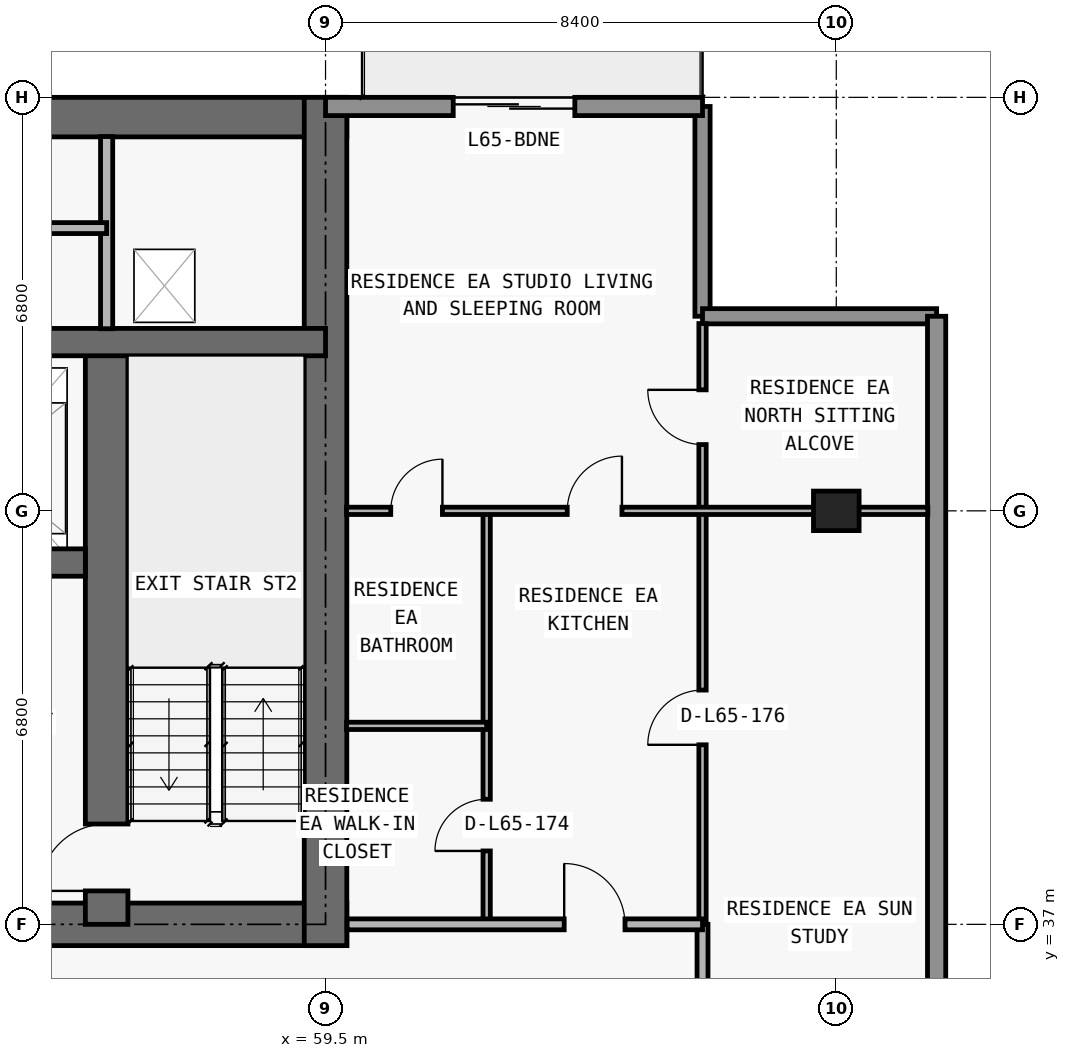
"""IFC4 building model, lengths in metres.
Left out: names, types, materials, properties, quantities, classifications, styles, units other than length and angle.
Written with IfcOpenShell. Run it as: python <this file> out.ifc"""

import sys

from ifc_helpers import new_model, si_unit, direction, frame, frame_2d, origin, origin_2d, place, context, subcontext, project, spatial, rectangle, extrude, element, fill, save


model = new_model("IFC4")
c1 = context("Model", 3, precision=1e-05, world=origin(), true_north=direction((0.0, 1.0)))
c2 = subcontext(c1, "Body", "Model", "MODEL_VIEW")
j1 = project(units=[si_unit("LENGTHUNIT", "METRE"), si_unit("PLANEANGLEUNIT", "RADIAN")], contexts=[c1])
p1 = place(None, origin())
s1 = spatial("IfcSite", under=j1, at=p1, CompositionType="ELEMENT")
p2 = place(p1, origin())
s2 = spatial("IfcBuilding", under=s1, at=p2, CompositionType="ELEMENT")
p3 = place(p2, frame((0.0, 0.0, 233.1)))
s3 = spatial("IfcBuildingStorey", under=s2, at=p3, CompositionType="ELEMENT", Elevation=233.1)
p4 = place(p3, frame((67.9, 43.8, 0.0), z_axis=(0.0, 0.0, 1.0), x_axis=(1.0, 0.0, 0.0)))
e1 = element("IfcColumn", 1, at=p4, inside=s3, PredefinedType="COLUMN", context=c2, shape_type="SweptSolid", body=[
    extrude(rectangle(XDim=0.75, YDim=0.65, at=origin_2d()), origin(), (0.0, 0.0, 1.0), 3.05),
])
p5 = place(p3, frame((17.95, 37.0, 0.0), z_axis=(0.0, 0.0, 1.0), x_axis=(1.0, 0.0, 0.0)))
e2 = element("IfcWall", 2, at=p5, inside=s3, PredefinedType="SHEAR", context=c2, shape_type="SweptSolid", body=[
    extrude(rectangle(XDim=41.9, YDim=0.7, at=frame_2d((20.95, 0.0))), origin(), (0.0, 0.0, 1.0), 3.05),
])
p6 = place(p5, frame((14.35, 0.0, 0.0)))
e3 = element("IfcOpeningElement", 3, at=p6, cuts=e2, PredefinedType="OPENING", context=c2, shape_type="SweptSolid", body=[
    extrude(rectangle(XDim=1.1, YDim=2.15, at=frame_2d((0.55, 1.075))), frame((0.0, 0.36, 0.0), z_axis=(0.0, -1.0, 0.0), x_axis=(1.0, 0.0, 0.0)), (0.0, 0.0, 1.0), 0.72),
])
p7 = place(p5, frame((6.2, 0.0, 0.0)))
e4 = element("IfcOpeningElement", 4, at=p7, cuts=e2, PredefinedType="OPENING", context=c2, shape_type="SweptSolid", body=[
    extrude(rectangle(XDim=1.05, YDim=2.15, at=frame_2d((0.525, 1.075))), frame((0.0, 0.36, 0.0), z_axis=(0.0, -1.0, 0.0), x_axis=(1.0, 0.0, 0.0)), (0.0, 0.0, 1.0), 0.72),
])
p8 = place(p5, frame((34.7, 0.0, 0.0)))
e5 = element("IfcOpeningElement", 5, at=p8, cuts=e2, PredefinedType="OPENING", context=c2, shape_type="SweptSolid", body=[
    extrude(rectangle(XDim=1.05, YDim=2.15, at=frame_2d((0.525, 1.075))), frame((0.0, 0.36, 0.0), z_axis=(0.0, -1.0, 0.0), x_axis=(1.0, 0.0, 0.0)), (0.0, 0.0, 1.0), 0.72),
])
p9 = place(p5, frame((10.812, 0.0, 0.0)))
e6 = element("IfcOpeningElement", 6, at=p9, cuts=e2, PredefinedType="OPENING", context=c2, shape_type="SweptSolid", body=[
    extrude(rectangle(XDim=1.05, YDim=2.15, at=frame_2d((0.525, 1.075))), frame((0.0, 0.36, 0.0), z_axis=(0.0, -1.0, 0.0), x_axis=(1.0, 0.0, 0.0)), (0.0, 0.0, 1.0), 0.72),
])
p10 = place(p5, frame((24.05, 0.0, 0.0)))
e7 = element("IfcOpeningElement", 7, at=p10, cuts=e2, PredefinedType="OPENING", context=c2, shape_type="SweptSolid", body=[
    extrude(rectangle(XDim=1.05, YDim=2.15, at=frame_2d((0.525, 1.075))), frame((0.0, 0.36, 0.0), z_axis=(0.0, -1.0, 0.0), x_axis=(1.0, 0.0, 0.0)), (0.0, 0.0, 1.0), 0.72),
])
p11 = place(p3, frame((17.95, 50.275, 0.0), z_axis=(0.0, 0.0, 1.0), x_axis=(1.0, 0.0, 0.0)))
e8 = element("IfcWall", 8, at=p11, inside=s3, PredefinedType="SHEAR", context=c2, shape_type="SweptSolid", body=[
    extrude(rectangle(XDim=41.9, YDim=0.65, at=frame_2d((20.95, 0.0))), origin(), (0.0, 0.0, 1.0), 3.05),
])
p12 = place(p3, frame((59.5, 36.65, 0.0), z_axis=(0.0, 0.0, 1.0), x_axis=(0.0, 1.0, 0.0)))
e9 = element("IfcWall", 9, at=p12, inside=s3, PredefinedType="SHEAR", context=c2, shape_type="SweptSolid", body=[
    extrude(rectangle(XDim=13.95, YDim=0.7, at=frame_2d((6.975, 0.0))), origin(), (0.0, 0.0, 1.0), 3.05),
])
p13 = place(p3, frame((55.9, 37.0, 0.0), z_axis=(0.0, 0.0, 1.0), x_axis=(0.0, 1.0, 0.0)))
e10 = element("IfcWall", 10, at=p13, inside=s3, PredefinedType="SHEAR", context=c2, shape_type="SweptSolid", body=[
    extrude(rectangle(XDim=9.575, YDim=0.7, at=frame_2d((4.788, 0.0))), origin(), (0.0, 0.0, 1.0), 3.05),
])
p14 = place(p13, frame((0.55, 0.0, 0.0)))
e11 = element("IfcOpeningElement", 11, at=p14, cuts=e10, PredefinedType="OPENING", context=c2, shape_type="SweptSolid", body=[
    extrude(rectangle(XDim=1.1, YDim=2.15, at=frame_2d((0.55, 1.075))), frame((0.0, 0.36, 0.0), z_axis=(0.0, -1.0, 0.0), x_axis=(1.0, 0.0, 0.0)), (0.0, 0.0, 1.0), 0.72),
])
p15 = place(p3, frame((22.25, 42.95, 0.0), z_axis=(0.0, 0.0, 1.0), x_axis=(1.0, 0.0, 0.0)))
e12 = element("IfcWall", 12, at=p15, inside=s3, PredefinedType="SHEAR", context=c2, shape_type="SweptSolid", body=[
    extrude(rectangle(XDim=33.3, YDim=0.45, at=frame_2d((16.65, 0.0))), origin(), (0.0, 0.0, 1.0), 3.05),
])
p16 = place(p15, frame((1.05, 0.0, 0.0)))
e13 = element("IfcOpeningElement", 13, at=p16, cuts=e12, PredefinedType="OPENING", context=c2, shape_type="SweptSolid", body=[
    extrude(rectangle(XDim=1.2, YDim=2.2, at=frame_2d((0.6, 1.1))), frame((0.0, 0.235, 0.0), z_axis=(0.0, -1.0, 0.0), x_axis=(1.0, 0.0, 0.0)), (0.0, 0.0, 1.0), 0.47),
])
p17 = place(p15, frame((31.05, 0.0, 0.0)))
e14 = element("IfcOpeningElement", 14, at=p17, cuts=e12, PredefinedType="OPENING", context=c2, shape_type="SweptSolid", body=[
    extrude(rectangle(XDim=1.2, YDim=2.2, at=frame_2d((0.6, 1.1))), frame((0.0, 0.235, 0.0), z_axis=(0.0, -1.0, 0.0), x_axis=(1.0, 0.0, 0.0)), (0.0, 0.0, 1.0), 0.47),
])
p18 = place(p15, frame((26.45, 0.0, 0.0)))
e15 = element("IfcOpeningElement", 15, at=p18, cuts=e12, PredefinedType="OPENING", context=c2, shape_type="SweptSolid", body=[
    extrude(rectangle(XDim=1.1, YDim=2.2, at=frame_2d((0.55, 1.1))), frame((0.0, 0.235, 0.0), z_axis=(0.0, -1.0, 0.0), x_axis=(1.0, 0.0, 0.0)), (0.0, 0.0, 1.0), 0.47),
])
p19 = place(p15, frame((5.95, 0.0, 0.0)))
e16 = element("IfcOpeningElement", 16, at=p19, cuts=e12, PredefinedType="OPENING", context=c2, shape_type="SweptSolid", body=[
    extrude(rectangle(XDim=1.1, YDim=2.2, at=frame_2d((0.55, 1.1))), frame((0.0, 0.235, 0.0), z_axis=(0.0, -1.0, 0.0), x_axis=(1.0, 0.0, 0.0)), (0.0, 0.0, 1.0), 0.47),
])
p20 = place(p15, frame((3.625, 0.0, 0.0)))
e17 = element("IfcOpeningElement", 17, at=p20, cuts=e12, PredefinedType="OPENING", context=c2, shape_type="SweptSolid", body=[
    extrude(rectangle(XDim=1.05, YDim=2.15, at=frame_2d((0.525, 1.075))), frame((0.0, 0.235, 0.0), z_axis=(0.0, -1.0, 0.0), x_axis=(1.0, 0.0, 0.0)), (0.0, 0.0, 1.0), 0.47),
])
p21 = place(p15, frame((28.675, 0.0, 0.0)))
e18 = element("IfcOpeningElement", 18, at=p21, cuts=e12, PredefinedType="OPENING", context=c2, shape_type="SweptSolid", body=[
    extrude(rectangle(XDim=1.05, YDim=2.15, at=frame_2d((0.525, 1.075))), frame((0.0, 0.235, 0.0), z_axis=(0.0, -1.0, 0.0), x_axis=(1.0, 0.0, 0.0)), (0.0, 0.0, 1.0), 0.47),
])
p22 = place(p15, frame((15.225, 0.0, 0.0)))
e19 = element("IfcOpeningElement", 19, at=p22, cuts=e12, PredefinedType="OPENING", context=c2, shape_type="SweptSolid", body=[
    extrude(rectangle(XDim=1.0, YDim=2.2, at=frame_2d((0.5, 1.1))), frame((0.0, 0.235, 0.0), z_axis=(0.0, -1.0, 0.0), x_axis=(1.0, 0.0, 0.0)), (0.0, 0.0, 1.0), 0.47),
])
p23 = place(p15, frame((21.975, 0.0, 0.0)))
e20 = element("IfcOpeningElement", 20, at=p23, cuts=e12, PredefinedType="OPENING", context=c2, shape_type="SweptSolid", body=[
    extrude(rectangle(XDim=1.0, YDim=2.2, at=frame_2d((0.5, 1.1))), frame((0.0, 0.235, 0.0), z_axis=(0.0, -1.0, 0.0), x_axis=(1.0, 0.0, 0.0)), (0.0, 0.0, 1.0), 0.47),
])
p24 = place(p3, frame((18.3, 46.575, 0.0), z_axis=(0.0, 0.0, 1.0), x_axis=(1.0, 0.0, 0.0)))
e21 = element("IfcWall", 21, at=p24, inside=s3, PredefinedType="SHEAR", context=c2, shape_type="SweptSolid", body=[
    extrude(rectangle(XDim=41.2, YDim=0.45, at=frame_2d((20.6, 0.0))), origin(), (0.0, 0.0, 1.0), 3.05),
])
p25 = place(p24, frame((7.575, 0.0, 0.0)))
e22 = element("IfcOpeningElement", 22, at=p25, cuts=e21, PredefinedType="OPENING", context=c2, shape_type="SweptSolid", body=[
    extrude(rectangle(XDim=1.05, YDim=2.15, at=frame_2d((0.525, 1.075))), frame((0.0, 0.235, 0.0), z_axis=(0.0, -1.0, 0.0), x_axis=(1.0, 0.0, 0.0)), (0.0, 0.0, 1.0), 0.47),
])
p26 = place(p24, frame((32.625, 0.0, 0.0)))
e23 = element("IfcOpeningElement", 23, at=p26, cuts=e21, PredefinedType="OPENING", context=c2, shape_type="SweptSolid", body=[
    extrude(rectangle(XDim=1.05, YDim=2.15, at=frame_2d((0.525, 1.075))), frame((0.0, 0.235, 0.0), z_axis=(0.0, -1.0, 0.0), x_axis=(1.0, 0.0, 0.0)), (0.0, 0.0, 1.0), 0.47),
])
p27 = place(p3, frame((65.7, 50.45, 0.0), z_axis=(0.0, 0.0, 1.0), x_axis=(0.0, -1.0, 0.0)))
e24 = element("IfcWall", 24, at=p27, inside=s3, PredefinedType="ELEMENTEDWALL", context=c2, shape_type="SweptSolid", body=[
    extrude(rectangle(XDim=3.45, YDim=0.25, at=frame_2d((1.725, 0.0))), origin(), (0.0, 0.0, 1.0), 3.05),
])
p28 = place(p3, frame((65.7, 47.0, 0.0), z_axis=(0.0, 0.0, 1.0), x_axis=(1.0, 0.0, 0.0)))
e25 = element("IfcWall", 25, at=p28, inside=s3, PredefinedType="ELEMENTEDWALL", context=c2, shape_type="SweptSolid", body=[
    extrude(rectangle(XDim=3.85, YDim=0.25, at=frame_2d((1.925, 0.0))), origin(), (0.0, 0.0, 1.0), 3.05),
])
p29 = place(p3, frame((69.55, 47.0, 0.0), z_axis=(0.0, 0.0, 1.0), x_axis=(0.0, -1.0, 0.0)))
e26 = element("IfcWall", 26, at=p29, inside=s3, PredefinedType="STANDARD", context=c2, shape_type="SweptSolid", body=[
    extrude(rectangle(XDim=16.85, YDim=0.3, at=frame_2d((8.425, 0.0))), origin(), (0.0, 0.0, 1.0), 3.05),
])
p30 = place(p3, frame((59.5, 50.45, 0.0), z_axis=(0.0, 0.0, 1.0), x_axis=(1.0, 0.0, 0.0)))
e27 = element("IfcWall", 27, at=p30, inside=s3, PredefinedType="STANDARD", context=c2, shape_type="SweptSolid", body=[
    extrude(rectangle(XDim=6.2, YDim=0.3, at=frame_2d((3.1, 0.0))), origin(), (0.0, 0.0, 1.0), 3.05),
])
p31 = place(p30, frame((2.1, 0.0, 0.0)))
e28 = element("IfcOpeningElement", 28, at=p31, cuts=e27, PredefinedType="OPENING", context=c2, shape_type="SweptSolid", body=[
    extrude(rectangle(XDim=2.0, YDim=2.3, at=frame_2d((1.0, 1.15))), frame((0.0, 0.16, 0.0), z_axis=(0.0, -1.0, 0.0), x_axis=(1.0, 0.0, 0.0)), (0.0, 0.0, 1.0), 0.32),
])
p32 = place(p3, frame((55.9, 46.795, 0.0), z_axis=(0.0, 0.0, 1.0), x_axis=(0.0, 1.0, 0.0)))
e29 = element("IfcWall", 29, at=p32, inside=s3, PredefinedType="PARTITIONING", context=c2, shape_type="SweptSolid", body=[
    extrude(rectangle(XDim=3.16, YDim=0.2, at=frame_2d((1.58, 0.0))), origin(), (0.0, 0.0, 1.0), 3.05),
])
p33 = place(p3, frame((62.15, 37.0, 0.0), z_axis=(0.0, 0.0, 1.0), x_axis=(0.0, 1.0, 0.0)))
e30 = element("IfcWall", 30, at=p33, inside=s3, PredefinedType="PARTITIONING", context=c2, shape_type="SweptSolid", body=[
    extrude(rectangle(XDim=6.8, YDim=0.12, at=frame_2d((3.4, 0.0))), origin(), (0.0, 0.0, 1.0), 3.05),
])
p34 = place(p33, frame((1.207, 0.0, 0.0)))
e31 = element("IfcOpeningElement", 31, at=p34, cuts=e30, PredefinedType="OPENING", context=c2, shape_type="SweptSolid", body=[
    extrude(rectangle(XDim=0.85, YDim=2.1, at=frame_2d((0.425, 1.05))), frame((0.0, 0.07, 0.0), z_axis=(0.0, -1.0, 0.0), x_axis=(1.0, 0.0, 0.0)), (0.0, 0.0, 1.0), 0.14),
])
p35 = place(p3, frame((65.7, 34.005, 0.0), z_axis=(0.0, 0.0, 1.0), x_axis=(0.0, 1.0, 0.0)))
e32 = element("IfcWall", 32, at=p35, inside=s3, PredefinedType="PARTITIONING", context=c2, shape_type="SweptSolid", body=[
    extrude(rectangle(XDim=2.995, YDim=0.18, at=frame_2d((1.498, 0.0))), origin(), (0.0, 0.0, 1.0), 2.629),
])
p36 = place(p3, frame((65.7, 37.005, 0.0), z_axis=(0.0, 0.0, 1.0), x_axis=(0.0, 1.0, 0.0)))
e33 = element("IfcWall", 33, at=p36, inside=s3, PredefinedType="PARTITIONING", context=c2, shape_type="SweptSolid", body=[
    extrude(rectangle(XDim=9.875, YDim=0.12, at=frame_2d((4.938, 0.0))), origin(), (0.0, 0.0, 1.0), 2.629),
])
p37 = place(p36, frame((2.948, 0.0, 0.0)))
e34 = element("IfcOpeningElement", 34, at=p37, cuts=e33, PredefinedType="OPENING", context=c2, shape_type="SweptSolid", body=[
    extrude(rectangle(XDim=0.9, YDim=2.15, at=frame_2d((0.45, 1.075))), frame((0.0, 0.07, 0.0), z_axis=(0.0, -1.0, 0.0), x_axis=(1.0, 0.0, 0.0)), (0.0, 0.0, 1.0), 0.14),
])
p38 = place(p36, frame((7.885, 0.0, 0.0)))
e35 = element("IfcOpeningElement", 35, at=p38, cuts=e33, PredefinedType="OPENING", context=c2, shape_type="SweptSolid", body=[
    extrude(rectangle(XDim=0.9, YDim=2.15, at=frame_2d((0.45, 1.075))), frame((0.0, 0.07, 0.0), z_axis=(0.0, -1.0, 0.0), x_axis=(1.0, 0.0, 0.0)), (0.0, 0.0, 1.0), 0.14),
])
p39 = place(p3, frame((59.855, 37.0, 0.0), z_axis=(0.0, 0.0, 1.0), x_axis=(1.0, 0.0, 0.0)))
e36 = element("IfcWall", 36, at=p39, inside=s3, PredefinedType="PARTITIONING", context=c2, shape_type="SweptSolid", body=[
    extrude(rectangle(XDim=5.845, YDim=0.18, at=frame_2d((2.922, 0.0))), origin(), (0.0, 0.0, 1.0), 3.05),
])
p40 = place(p39, frame((3.57, 0.0, 0.0)))
e37 = element("IfcOpeningElement", 37, at=p40, cuts=e36, PredefinedType="OPENING", context=c2, shape_type="SweptSolid", body=[
    extrude(rectangle(XDim=1.0, YDim=2.2, at=frame_2d((0.5, 1.1))), frame((0.0, 0.1, 0.0), z_axis=(0.0, -1.0, 0.0), x_axis=(1.0, 0.0, 0.0)), (0.0, 0.0, 1.0), 0.2),
])
p41 = place(p3, frame((59.845, 40.264, 0.0), z_axis=(0.0, 0.0, 1.0), x_axis=(1.0, 0.0, 0.0)))
e38 = element("IfcWall", 38, at=p41, inside=s3, PredefinedType="PARTITIONING", context=c2, shape_type="SweptSolid", body=[
    extrude(rectangle(XDim=2.305, YDim=0.12, at=frame_2d((1.152, 0.0))), origin(), (0.0, 0.0, 1.0), 3.05),
])
p42 = place(p3, frame((59.845, 43.8, 0.0), z_axis=(0.0, 0.0, 1.0), x_axis=(1.0, 0.0, 0.0)))
e39 = element("IfcWall", 39, at=p42, inside=s3, PredefinedType="PARTITIONING", context=c2, shape_type="SweptSolid", body=[
    extrude(rectangle(XDim=9.56, YDim=0.12, at=frame_2d((4.78, 0.0))), origin(), (0.0, 0.0, 1.0), 2.418),
])
p43 = place(p42, frame((3.63, 0.0, 0.0)))
e40 = element("IfcOpeningElement", 40, at=p43, cuts=e39, PredefinedType="OPENING", context=c2, shape_type="SweptSolid", body=[
    extrude(rectangle(XDim=0.9, YDim=2.15, at=frame_2d((0.45, 1.075))), frame((0.0, 0.07, 0.0), z_axis=(0.0, -1.0, 0.0), x_axis=(1.0, 0.0, 0.0)), (0.0, 0.0, 1.0), 0.14),
])
p44 = place(p42, frame((0.728, 0.0, 0.0)))
e41 = element("IfcOpeningElement", 41, at=p44, cuts=e39, PredefinedType="OPENING", context=c2, shape_type="SweptSolid", body=[
    extrude(rectangle(XDim=0.85, YDim=2.1, at=frame_2d((0.425, 1.05))), frame((0.0, 0.07, 0.0), z_axis=(0.0, -1.0, 0.0), x_axis=(1.0, 0.0, 0.0)), (0.0, 0.0, 1.0), 0.14),
])
p45 = place(p3, frame((31.4, 48.45, 0.0), z_axis=(0.0, 0.0, 1.0), x_axis=(1.0, 0.0, 0.0)))
e42 = element("IfcWall", 42, at=p45, inside=s3, PredefinedType="PARTITIONING", context=c2, shape_type="SweptSolid", body=[
    extrude(rectangle(XDim=24.5, YDim=0.18, at=frame_2d((12.25, 0.0))), origin(), (0.0, 0.0, 1.0), 3.05),
])
p46 = place(p45, frame((1.775, 0.0, 0.0)))
e43 = element("IfcOpeningElement", 43, at=p46, cuts=e42, PredefinedType="OPENING", context=c2, shape_type="SweptSolid", body=[
    extrude(rectangle(XDim=1.2, YDim=2.2, at=frame_2d((0.6, 1.1))), frame((0.0, 0.1, 0.0), z_axis=(0.0, -1.0, 0.0), x_axis=(1.0, 0.0, 0.0)), (0.0, 0.0, 1.0), 0.2),
])
p47 = place(p45, frame((9.35, 0.0, 0.0)))
e44 = element("IfcOpeningElement", 44, at=p47, cuts=e42, PredefinedType="OPENING", context=c2, shape_type="SweptSolid", body=[
    extrude(rectangle(XDim=1.0, YDim=2.2, at=frame_2d((0.5, 1.1))), frame((0.0, 0.1, 0.0), z_axis=(0.0, -1.0, 0.0), x_axis=(1.0, 0.0, 0.0)), (0.0, 0.0, 1.0), 0.2),
])
p48 = place(p45, frame((16.725, 0.0, 0.0)))
e45 = element("IfcOpeningElement", 45, at=p48, cuts=e42, PredefinedType="OPENING", context=c2, shape_type="SweptSolid", body=[
    extrude(rectangle(XDim=1.2, YDim=2.2, at=frame_2d((0.6, 1.1))), frame((0.0, 0.1, 0.0), z_axis=(0.0, -1.0, 0.0), x_axis=(1.0, 0.0, 0.0)), (0.0, 0.0, 1.0), 0.2),
])
p49 = place(p45, frame((21.675, 0.0, 0.0)))
e46 = element("IfcOpeningElement", 46, at=p49, cuts=e42, PredefinedType="OPENING", context=c2, shape_type="SweptSolid", body=[
    extrude(rectangle(XDim=0.85, YDim=2.1, at=frame_2d((0.425, 1.05))), frame((0.0, 0.1, 0.0), z_axis=(0.0, -1.0, 0.0), x_axis=(1.0, 0.0, 0.0)), (0.0, 0.0, 1.0), 0.2),
])
p50 = place(p31, origin())
e47 = element("IfcDoor", 47, at=p50, inside=s3, OperationType="DOUBLE_DOOR_SLIDING", PredefinedType="DOOR", context=c2, shape_type="SweptSolid", body=[
    extrude(rectangle(XDim=2.0, YDim=2.3, at=frame_2d((1.0, 1.15))), frame((0.0, 0.025, 0.0), z_axis=(0.0, -1.0, 0.0), x_axis=(1.0, 0.0, 0.0)), (0.0, 0.0, 1.0), 0.05),
])
fill(e28, e47)
p51 = place(p14, origin())
e48 = element("IfcDoor", 48, at=p51, inside=s3, OperationType="SINGLE_SWING_LEFT", PredefinedType="DOOR", context=c2, shape_type="SweptSolid", body=[
    extrude(rectangle(XDim=1.1, YDim=2.15, at=frame_2d((0.55, 1.075))), frame((0.0, 0.025, 0.0), z_axis=(0.0, -1.0, 0.0), x_axis=(1.0, 0.0, 0.0)), (0.0, 0.0, 1.0), 0.05),
])
fill(e11, e48)
p52 = place(p40, origin())
e49 = element("IfcDoor", 49, at=p52, inside=s3, OperationType="SINGLE_SWING_LEFT", PredefinedType="DOOR", context=c2, shape_type="SweptSolid", body=[
    extrude(rectangle(XDim=1.0, YDim=2.2, at=frame_2d((0.5, 1.1))), frame((0.0, 0.025, 0.0), z_axis=(0.0, -1.0, 0.0), x_axis=(1.0, 0.0, 0.0)), (0.0, 0.0, 1.0), 0.05),
])
fill(e37, e49)
p53 = place(p43, origin())
e50 = element("IfcDoor", 50, at=p53, inside=s3, OperationType="SINGLE_SWING_RIGHT", PredefinedType="DOOR", context=c2, shape_type="SweptSolid", body=[
    extrude(rectangle(XDim=0.9, YDim=2.15, at=frame_2d((0.45, 1.075))), frame((0.0, 0.025, 0.0), z_axis=(0.0, -1.0, 0.0), x_axis=(1.0, 0.0, 0.0)), (0.0, 0.0, 1.0), 0.05),
])
fill(e40, e50)
p54 = place(p34, origin())
e51 = element("IfcDoor", 51, at=p54, inside=s3, OperationType="SINGLE_SWING_LEFT", PredefinedType="DOOR", context=c2, shape_type="SweptSolid", body=[
    extrude(rectangle(XDim=0.85, YDim=2.1, at=frame_2d((0.425, 1.05))), frame((0.0, 0.025, 0.0), z_axis=(0.0, -1.0, 0.0), x_axis=(1.0, 0.0, 0.0)), (0.0, 0.0, 1.0), 0.05),
])
fill(e31, e51)
p55 = place(p44, origin())
e52 = element("IfcDoor", 52, at=p55, inside=s3, OperationType="SINGLE_SWING_RIGHT", PredefinedType="DOOR", context=c2, shape_type="SweptSolid", body=[
    extrude(rectangle(XDim=0.85, YDim=2.1, at=frame_2d((0.425, 1.05))), frame((0.0, 0.025, 0.0), z_axis=(0.0, -1.0, 0.0), x_axis=(1.0, 0.0, 0.0)), (0.0, 0.0, 1.0), 0.05),
])
fill(e41, e52)
p56 = place(p37, origin())
e53 = element("IfcDoor", 53, at=p56, inside=s3, OperationType="SINGLE_SWING_LEFT", PredefinedType="DOOR", context=c2, shape_type="SweptSolid", body=[
    extrude(rectangle(XDim=0.9, YDim=2.15, at=frame_2d((0.45, 1.075))), frame((0.0, 0.025, 0.0), z_axis=(0.0, -1.0, 0.0), x_axis=(1.0, 0.0, 0.0)), (0.0, 0.0, 1.0), 0.05),
])
fill(e34, e53)
p57 = place(p38, origin())
e54 = element("IfcDoor", 54, at=p57, inside=s3, OperationType="SINGLE_SWING_RIGHT", PredefinedType="DOOR", context=c2, shape_type="SweptSolid", body=[
    extrude(rectangle(XDim=0.9, YDim=2.15, at=frame_2d((0.45, 1.075))), frame((0.0, 0.025, 0.0), z_axis=(0.0, -1.0, 0.0), x_axis=(1.0, 0.0, 0.0)), (0.0, 0.0, 1.0), 0.05),
])
fill(e35, e54)
save(model, sys.argv[1])
